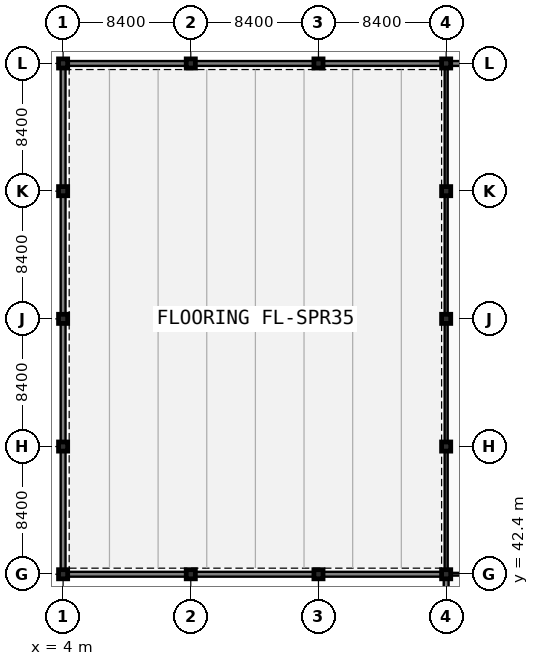
"""IFC4 building model, lengths in metres.
Left out: names, types, materials, properties, quantities, classifications, styles, units other than length and angle.
Written with IfcOpenShell. Run it as: python <this file> out.ifc"""

import sys

from ifc_helpers import new_model, si_unit, direction, frame, frame_2d, origin, origin_2d, place, context, subcontext, project, spatial, rectangle, extrude, element, fill, save


model = new_model("IFC4")
c1 = context("Model", 3, precision=1e-05, world=origin(), true_north=direction((0.0, 1.0)))
c2 = subcontext(c1, "Body", "Model", "MODEL_VIEW")
j1 = project(units=[si_unit("LENGTHUNIT", "METRE"), si_unit("PLANEANGLEUNIT", "RADIAN")], contexts=[c1])
p1 = place(None, origin())
s1 = spatial("IfcSite", under=j1, at=p1, CompositionType="ELEMENT")
p2 = place(p1, origin())
s2 = spatial("IfcBuilding", under=s1, at=p2, CompositionType="ELEMENT")
p3 = place(p2, origin())
s3 = spatial("IfcBuildingStorey", under=s2, at=p3, CompositionType="ELEMENT", Elevation=0.0)
for number, where, z_axis, x_axis in (
    (1, (4.0, 42.4, 0.0), (0.0, 0.0, 1.0), (1.0, 0.0, 0.0)),
    (2, (4.0, 50.8, 0.0), (0.0, 0.0, 1.0), (1.0, 0.0, 0.0)),
    (3, (4.0, 59.2, 0.0), (0.0, 0.0, 1.0), (1.0, 0.0, 0.0)),
    (4, (4.0, 67.6, 0.0), (0.0, 0.0, 1.0), (1.0, 0.0, 0.0)),
    (5, (4.0, 76.0, 0.0), (0.0, 0.0, 1.0), (1.0, 0.0, 0.0)),
    (6, (12.4, 42.4, 0.0), (0.0, 0.0, 1.0), (1.0, 0.0, 0.0)),
    (7, (12.4, 76.0, 0.0), (0.0, 0.0, 1.0), (1.0, 0.0, 0.0)),
    (8, (20.8, 42.4, 0.0), (0.0, 0.0, 1.0), (1.0, 0.0, 0.0)),
    (9, (20.8, 76.0, 0.0), (0.0, 0.0, 1.0), (1.0, 0.0, 0.0)),
    (10, (29.2, 42.4, 0.0), (0.0, 0.0, 1.0), (1.0, 0.0, 0.0)),
    (11, (29.2, 50.8, 0.0), (0.0, 0.0, 1.0), (1.0, 0.0, 0.0)),
    (12, (29.2, 59.2, 0.0), (0.0, 0.0, 1.0), (1.0, 0.0, 0.0)),
    (13, (29.2, 67.6, 0.0), (0.0, 0.0, 1.0), (1.0, 0.0, 0.0)),
    (14, (29.2, 76.0, 0.0), (0.0, 0.0, 1.0), (1.0, 0.0, 0.0)),
):
    element("IfcColumn", number, at=place(p3, frame(where, z_axis=z_axis, x_axis=x_axis)), inside=s3, PredefinedType="COLUMN", context=c2, shape_type="SweptSolid", body=[
        extrude(rectangle(XDim=0.6, YDim=0.6, at=origin_2d()), origin(), (0.0, 0.0, 1.0), 5.4),
    ])
p4 = place(p3, frame((29.35, 42.4, 0.0), z_axis=(0.0, 0.0, 1.0), x_axis=(1.0, 0.0, 0.0)))
e15 = element("IfcWall", 15, at=p4, inside=s3, PredefinedType="PARTITIONING", context=c2, shape_type="SweptSolid", body=[
    extrude(rectangle(XDim=8.1, YDim=0.18, at=frame_2d((4.05, 0.0))), origin(), (0.0, 0.0, 1.0), 4.64),
])
p5 = place(p4, frame((2.205, 0.0, -0.01)))
e16 = element("IfcOpeningElement", 16, at=p5, cuts=e15, PredefinedType="OPENING", context=c2, shape_type="SweptSolid", body=[
    extrude(rectangle(XDim=1.8, YDim=2.26, at=frame_2d((0.9, 1.13))), frame((0.0, 0.1, 0.0), z_axis=(0.0, -1.0, 0.0), x_axis=(1.0, 0.0, 0.0)), (0.0, 0.0, 1.0), 0.2),
])
p6 = place(p3, frame((29.2, 42.25, 0.0), z_axis=(0.0, 0.0, 1.0), x_axis=(0.0, 1.0, 0.0)))
e17 = element("IfcWall", 17, at=p6, inside=s3, PredefinedType="PARTITIONING", context=c2, shape_type="SweptSolid", body=[
    extrude(rectangle(XDim=33.6, YDim=0.2, at=frame_2d((16.8, 0.0))), origin(), (0.0, 0.0, 1.0), 4.54),
])
p7 = place(p6, frame((14.31, 0.0, -0.01)))
e18 = element("IfcOpeningElement", 18, at=p7, cuts=e17, PredefinedType="OPENING", context=c2, shape_type="SweptSolid", body=[
    extrude(rectangle(XDim=1.8, YDim=2.26, at=frame_2d((0.9, 1.13))), frame((0.0, 0.11, 0.0), z_axis=(0.0, -1.0, 0.0), x_axis=(1.0, 0.0, 0.0)), (0.0, 0.0, 1.0), 0.22),
])
p8 = place(p3, frame((4.0, 42.4, 0.0), z_axis=(0.0, 0.0, 1.0), x_axis=(1.0, 0.0, 0.0)))
e19 = element("IfcWall", 19, at=p8, inside=s3, PredefinedType="SOLIDWALL", context=c2, shape_type="SweptSolid", body=[
    extrude(rectangle(XDim=8.4, YDim=0.32, at=frame_2d((4.2, 0.0))), origin(), (0.0, 0.0, 1.0), 4.79),
])
p9 = place(p8, frame((0.46, 0.0, 0.9)))
e20 = element("IfcOpeningElement", 20, at=p9, cuts=e19, PredefinedType="OPENING", context=c2, shape_type="SweptSolid", body=[
    extrude(rectangle(XDim=2.4, YDim=2.35, at=frame_2d((1.2, 1.175))), frame((0.0, 0.17, 0.0), z_axis=(0.0, -1.0, 0.0), x_axis=(1.0, 0.0, 0.0)), (0.0, 0.0, 1.0), 0.34),
])
p10 = place(p8, frame((5.46, 0.0, 0.9)))
e21 = element("IfcOpeningElement", 21, at=p10, cuts=e19, PredefinedType="OPENING", context=c2, shape_type="SweptSolid", body=[
    extrude(rectangle(XDim=2.4, YDim=2.35, at=frame_2d((1.2, 1.175))), frame((0.0, 0.17, 0.0), z_axis=(0.0, -1.0, 0.0), x_axis=(1.0, 0.0, 0.0)), (0.0, 0.0, 1.0), 0.34),
])
p11 = place(p3, frame((12.4, 42.4, 0.0), z_axis=(0.0, 0.0, 1.0), x_axis=(1.0, 0.0, 0.0)))
e22 = element("IfcWall", 22, at=p11, inside=s3, PredefinedType="SOLIDWALL", context=c2, shape_type="SweptSolid", body=[
    extrude(rectangle(XDim=8.4, YDim=0.32, at=frame_2d((4.2, 0.0))), origin(), (0.0, 0.0, 1.0), 4.79),
])
p12 = place(p11, frame((0.46, 0.0, 0.9)))
e23 = element("IfcOpeningElement", 23, at=p12, cuts=e22, PredefinedType="OPENING", context=c2, shape_type="SweptSolid", body=[
    extrude(rectangle(XDim=2.4, YDim=2.35, at=frame_2d((1.2, 1.175))), frame((0.0, 0.17, 0.0), z_axis=(0.0, -1.0, 0.0), x_axis=(1.0, 0.0, 0.0)), (0.0, 0.0, 1.0), 0.34),
])
p13 = place(p11, frame((5.46, 0.0, 0.9)))
e24 = element("IfcOpeningElement", 24, at=p13, cuts=e22, PredefinedType="OPENING", context=c2, shape_type="SweptSolid", body=[
    extrude(rectangle(XDim=2.4, YDim=2.35, at=frame_2d((1.2, 1.175))), frame((0.0, 0.17, 0.0), z_axis=(0.0, -1.0, 0.0), x_axis=(1.0, 0.0, 0.0)), (0.0, 0.0, 1.0), 0.34),
])
p14 = place(p3, frame((20.8, 42.4, 0.0), z_axis=(0.0, 0.0, 1.0), x_axis=(1.0, 0.0, 0.0)))
e25 = element("IfcWall", 25, at=p14, inside=s3, PredefinedType="SOLIDWALL", context=c2, shape_type="SweptSolid", body=[
    extrude(rectangle(XDim=8.4, YDim=0.32, at=frame_2d((4.2, 0.0))), origin(), (0.0, 0.0, 1.0), 4.64),
])
p15 = place(p14, frame((0.46, 0.0, 0.9)))
e26 = element("IfcOpeningElement", 26, at=p15, cuts=e25, PredefinedType="OPENING", context=c2, shape_type="SweptSolid", body=[
    extrude(rectangle(XDim=2.4, YDim=2.35, at=frame_2d((1.2, 1.175))), frame((0.0, 0.17, 0.0), z_axis=(0.0, -1.0, 0.0), x_axis=(1.0, 0.0, 0.0)), (0.0, 0.0, 1.0), 0.34),
])
p16 = place(p14, frame((5.46, 0.0, 0.9)))
e27 = element("IfcOpeningElement", 27, at=p16, cuts=e25, PredefinedType="OPENING", context=c2, shape_type="SweptSolid", body=[
    extrude(rectangle(XDim=2.4, YDim=2.35, at=frame_2d((1.2, 1.175))), frame((0.0, 0.17, 0.0), z_axis=(0.0, -1.0, 0.0), x_axis=(1.0, 0.0, 0.0)), (0.0, 0.0, 1.0), 0.34),
])
p17 = place(p3, frame((12.4, 76.0, 0.0), z_axis=(0.0, 0.0, 1.0), x_axis=(-1.0, 0.0, 0.0)))
e28 = element("IfcWall", 28, at=p17, inside=s3, PredefinedType="SOLIDWALL", context=c2, shape_type="SweptSolid", body=[
    extrude(rectangle(XDim=8.4, YDim=0.32, at=frame_2d((4.2, 0.0))), origin(), (0.0, 0.0, 1.0), 4.79),
])
p18 = place(p17, frame((0.46, 0.0, 0.9)))
e29 = element("IfcOpeningElement", 29, at=p18, cuts=e28, PredefinedType="OPENING", context=c2, shape_type="SweptSolid", body=[
    extrude(rectangle(XDim=2.4, YDim=2.35, at=frame_2d((1.2, 1.175))), frame((0.0, 0.17, 0.0), z_axis=(0.0, -1.0, 0.0), x_axis=(1.0, 0.0, 0.0)), (0.0, 0.0, 1.0), 0.34),
])
p19 = place(p17, frame((5.46, 0.0, 0.9)))
e30 = element("IfcOpeningElement", 30, at=p19, cuts=e28, PredefinedType="OPENING", context=c2, shape_type="SweptSolid", body=[
    extrude(rectangle(XDim=2.4, YDim=2.35, at=frame_2d((1.2, 1.175))), frame((0.0, 0.17, 0.0), z_axis=(0.0, -1.0, 0.0), x_axis=(1.0, 0.0, 0.0)), (0.0, 0.0, 1.0), 0.34),
])
p20 = place(p3, frame((20.8, 76.0, 0.0), z_axis=(0.0, 0.0, 1.0), x_axis=(-1.0, 0.0, 0.0)))
e31 = element("IfcWall", 31, at=p20, inside=s3, PredefinedType="SOLIDWALL", context=c2, shape_type="SweptSolid", body=[
    extrude(rectangle(XDim=8.4, YDim=0.32, at=frame_2d((4.2, 0.0))), origin(), (0.0, 0.0, 1.0), 4.79),
])
p21 = place(p20, frame((0.46, 0.0, 0.9)))
e32 = element("IfcOpeningElement", 32, at=p21, cuts=e31, PredefinedType="OPENING", context=c2, shape_type="SweptSolid", body=[
    extrude(rectangle(XDim=2.4, YDim=2.35, at=frame_2d((1.2, 1.175))), frame((0.0, 0.17, 0.0), z_axis=(0.0, -1.0, 0.0), x_axis=(1.0, 0.0, 0.0)), (0.0, 0.0, 1.0), 0.34),
])
p22 = place(p20, frame((5.46, 0.0, 0.9)))
e33 = element("IfcOpeningElement", 33, at=p22, cuts=e31, PredefinedType="OPENING", context=c2, shape_type="SweptSolid", body=[
    extrude(rectangle(XDim=2.4, YDim=2.35, at=frame_2d((1.2, 1.175))), frame((0.0, 0.17, 0.0), z_axis=(0.0, -1.0, 0.0), x_axis=(1.0, 0.0, 0.0)), (0.0, 0.0, 1.0), 0.34),
])
p23 = place(p3, frame((29.2, 76.0, 0.0), z_axis=(0.0, 0.0, 1.0), x_axis=(-1.0, 0.0, 0.0)))
e34 = element("IfcWall", 34, at=p23, inside=s3, PredefinedType="SOLIDWALL", context=c2, shape_type="SweptSolid", body=[
    extrude(rectangle(XDim=8.4, YDim=0.32, at=frame_2d((4.2, 0.0))), origin(), (0.0, 0.0, 1.0), 4.64),
])
p24 = place(p23, frame((0.46, 0.0, 0.9)))
e35 = element("IfcOpeningElement", 35, at=p24, cuts=e34, PredefinedType="OPENING", context=c2, shape_type="SweptSolid", body=[
    extrude(rectangle(XDim=2.4, YDim=2.35, at=frame_2d((1.2, 1.175))), frame((0.0, 0.17, 0.0), z_axis=(0.0, -1.0, 0.0), x_axis=(1.0, 0.0, 0.0)), (0.0, 0.0, 1.0), 0.34),
])
p25 = place(p23, frame((5.46, 0.0, 0.9)))
e36 = element("IfcOpeningElement", 36, at=p25, cuts=e34, PredefinedType="OPENING", context=c2, shape_type="SweptSolid", body=[
    extrude(rectangle(XDim=2.4, YDim=2.35, at=frame_2d((1.2, 1.175))), frame((0.0, 0.17, 0.0), z_axis=(0.0, -1.0, 0.0), x_axis=(1.0, 0.0, 0.0)), (0.0, 0.0, 1.0), 0.34),
])
p26 = place(p3, frame((37.6, 76.0, 0.0), z_axis=(0.0, 0.0, 1.0), x_axis=(-1.0, 0.0, 0.0)))
e37 = element("IfcWall", 37, at=p26, inside=s3, PredefinedType="SOLIDWALL", context=c2, shape_type="SweptSolid", body=[
    extrude(rectangle(XDim=8.4, YDim=0.32, at=frame_2d((4.2, 0.0))), origin(), (0.0, 0.0, 1.0), 4.64),
])
p27 = place(p26, frame((0.46, 0.0, 0.9)))
e38 = element("IfcOpeningElement", 38, at=p27, cuts=e37, PredefinedType="OPENING", context=c2, shape_type="SweptSolid", body=[
    extrude(rectangle(XDim=2.4, YDim=2.35, at=frame_2d((1.2, 1.175))), frame((0.0, 0.17, 0.0), z_axis=(0.0, -1.0, 0.0), x_axis=(1.0, 0.0, 0.0)), (0.0, 0.0, 1.0), 0.34),
])
p28 = place(p26, frame((5.46, 0.0, 0.9)))
e39 = element("IfcOpeningElement", 39, at=p28, cuts=e37, PredefinedType="OPENING", context=c2, shape_type="SweptSolid", body=[
    extrude(rectangle(XDim=2.4, YDim=2.35, at=frame_2d((1.2, 1.175))), frame((0.0, 0.17, 0.0), z_axis=(0.0, -1.0, 0.0), x_axis=(1.0, 0.0, 0.0)), (0.0, 0.0, 1.0), 0.34),
])
p29 = place(p3, frame((4.0, 50.8, 0.0), z_axis=(0.0, 0.0, 1.0), x_axis=(0.0, -1.0, 0.0)))
e40 = element("IfcWall", 40, at=p29, inside=s3, PredefinedType="SOLIDWALL", context=c2, shape_type="SweptSolid", body=[
    extrude(rectangle(XDim=8.4, YDim=0.32, at=frame_2d((4.2, 0.0))), origin(), (0.0, 0.0, 1.0), 4.79),
])
p30 = place(p3, frame((4.0, 59.2, 0.0), z_axis=(0.0, 0.0, 1.0), x_axis=(0.0, -1.0, 0.0)))
e41 = element("IfcWall", 41, at=p30, inside=s3, PredefinedType="SOLIDWALL", context=c2, shape_type="SweptSolid", body=[
    extrude(rectangle(XDim=8.4, YDim=0.32, at=frame_2d((4.2, 0.0))), origin(), (0.0, 0.0, 1.0), 4.79),
])
p31 = place(p30, frame((3.5, 0.0, -0.01)))
e42 = element("IfcOpeningElement", 42, at=p31, cuts=e41, PredefinedType="OPENING", context=c2, shape_type="SweptSolid", body=[
    extrude(rectangle(XDim=1.4, YDim=2.21, at=frame_2d((0.7, 1.105))), frame((0.0, 0.17, 0.0), z_axis=(0.0, -1.0, 0.0), x_axis=(1.0, 0.0, 0.0)), (0.0, 0.0, 1.0), 0.34),
])
p32 = place(p3, frame((4.0, 67.6, 0.0), z_axis=(0.0, 0.0, 1.0), x_axis=(0.0, -1.0, 0.0)))
e43 = element("IfcWall", 43, at=p32, inside=s3, PredefinedType="SOLIDWALL", context=c2, shape_type="SweptSolid", body=[
    extrude(rectangle(XDim=8.4, YDim=0.32, at=frame_2d((4.2, 0.0))), origin(), (0.0, 0.0, 1.0), 4.79),
])
p33 = place(p3, frame((4.0, 76.0, 0.0), z_axis=(0.0, 0.0, 1.0), x_axis=(0.0, -1.0, 0.0)))
e44 = element("IfcWall", 44, at=p33, inside=s3, PredefinedType="SOLIDWALL", context=c2, shape_type="SweptSolid", body=[
    extrude(rectangle(XDim=8.4, YDim=0.32, at=frame_2d((4.2, 0.0))), origin(), (0.0, 0.0, 1.0), 4.79),
])
p34 = place(p3, frame((29.2, 42.4, 0.0), z_axis=(0.0, 0.0, 1.0), x_axis=(0.0, -1.0, 0.0)))
e45 = element("IfcWall", 45, at=p34, inside=s3, PredefinedType="SOLIDWALL", context=c2, shape_type="SweptSolid", body=[
    extrude(rectangle(XDim=4.8, YDim=0.32, at=frame_2d((2.4, 0.0))), origin(), (0.0, 0.0, 1.0), 4.64),
])
p35 = place(p34, frame((1.46, 0.0, 0.9)))
e46 = element("IfcOpeningElement", 46, at=p35, cuts=e45, PredefinedType="OPENING", context=c2, shape_type="SweptSolid", body=[
    extrude(rectangle(XDim=1.8, YDim=2.2, at=frame_2d((0.9, 1.1))), frame((0.0, 0.17, 0.0), z_axis=(0.0, -1.0, 0.0), x_axis=(1.0, 0.0, 0.0)), (0.0, 0.0, 1.0), 0.34),
])
p36 = place(p7, frame((0.0, 0.0, 0.01)))
e47 = element("IfcDoor", 47, at=p36, inside=s3, OperationType="DOUBLE_SWING_LEFT", PredefinedType="DOOR", context=c2, shape_type="SweptSolid", body=[
    extrude(rectangle(XDim=1.8, YDim=2.25, at=frame_2d((0.9, 1.125))), frame((0.0, 0.025, 0.0), z_axis=(0.0, -1.0, 0.0), x_axis=(1.0, 0.0, 0.0)), (0.0, 0.0, 1.0), 0.05),
])
fill(e18, e47)
p37 = place(p9, origin())
e48 = element("IfcWindow", 48, at=p37, inside=s3, PartitioningType="TRIPLE_PANEL_VERTICAL", PredefinedType="WINDOW", context=c2, shape_type="SweptSolid", body=[
    extrude(rectangle(XDim=2.4, YDim=2.35, at=frame_2d((1.2, 1.175))), frame((0.0, 0.03, 0.0), z_axis=(0.0, -1.0, 0.0), x_axis=(1.0, 0.0, 0.0)), (0.0, 0.0, 1.0), 0.06),
])
fill(e20, e48)
p38 = place(p10, origin())
e49 = element("IfcWindow", 49, at=p38, inside=s3, PartitioningType="TRIPLE_PANEL_VERTICAL", PredefinedType="WINDOW", context=c2, shape_type="SweptSolid", body=[
    extrude(rectangle(XDim=2.4, YDim=2.35, at=frame_2d((1.2, 1.175))), frame((0.0, 0.03, 0.0), z_axis=(0.0, -1.0, 0.0), x_axis=(1.0, 0.0, 0.0)), (0.0, 0.0, 1.0), 0.06),
])
fill(e21, e49)
p39 = place(p12, origin())
e50 = element("IfcWindow", 50, at=p39, inside=s3, PartitioningType="TRIPLE_PANEL_VERTICAL", PredefinedType="WINDOW", context=c2, shape_type="SweptSolid", body=[
    extrude(rectangle(XDim=2.4, YDim=2.35, at=frame_2d((1.2, 1.175))), frame((0.0, 0.03, 0.0), z_axis=(0.0, -1.0, 0.0), x_axis=(1.0, 0.0, 0.0)), (0.0, 0.0, 1.0), 0.06),
])
fill(e23, e50)
p40 = place(p13, origin())
e51 = element("IfcWindow", 51, at=p40, inside=s3, PartitioningType="TRIPLE_PANEL_VERTICAL", PredefinedType="WINDOW", context=c2, shape_type="SweptSolid", body=[
    extrude(rectangle(XDim=2.4, YDim=2.35, at=frame_2d((1.2, 1.175))), frame((0.0, 0.03, 0.0), z_axis=(0.0, -1.0, 0.0), x_axis=(1.0, 0.0, 0.0)), (0.0, 0.0, 1.0), 0.06),
])
fill(e24, e51)
p41 = place(p15, origin())
e52 = element("IfcWindow", 52, at=p41, inside=s3, PartitioningType="TRIPLE_PANEL_VERTICAL", PredefinedType="WINDOW", context=c2, shape_type="SweptSolid", body=[
    extrude(rectangle(XDim=2.4, YDim=2.35, at=frame_2d((1.2, 1.175))), frame((0.0, 0.03, 0.0), z_axis=(0.0, -1.0, 0.0), x_axis=(1.0, 0.0, 0.0)), (0.0, 0.0, 1.0), 0.06),
])
fill(e26, e52)
p42 = place(p16, origin())
e53 = element("IfcWindow", 53, at=p42, inside=s3, PartitioningType="TRIPLE_PANEL_VERTICAL", PredefinedType="WINDOW", context=c2, shape_type="SweptSolid", body=[
    extrude(rectangle(XDim=2.4, YDim=2.35, at=frame_2d((1.2, 1.175))), frame((0.0, 0.03, 0.0), z_axis=(0.0, -1.0, 0.0), x_axis=(1.0, 0.0, 0.0)), (0.0, 0.0, 1.0), 0.06),
])
fill(e27, e53)
p43 = place(p18, origin())
e54 = element("IfcWindow", 54, at=p43, inside=s3, PartitioningType="TRIPLE_PANEL_VERTICAL", PredefinedType="WINDOW", context=c2, shape_type="SweptSolid", body=[
    extrude(rectangle(XDim=2.4, YDim=2.35, at=frame_2d((1.2, 1.175))), frame((0.0, 0.03, 0.0), z_axis=(0.0, -1.0, 0.0), x_axis=(1.0, 0.0, 0.0)), (0.0, 0.0, 1.0), 0.06),
])
fill(e29, e54)
p44 = place(p19, origin())
e55 = element("IfcWindow", 55, at=p44, inside=s3, PartitioningType="TRIPLE_PANEL_VERTICAL", PredefinedType="WINDOW", context=c2, shape_type="SweptSolid", body=[
    extrude(rectangle(XDim=2.4, YDim=2.35, at=frame_2d((1.2, 1.175))), frame((0.0, 0.03, 0.0), z_axis=(0.0, -1.0, 0.0), x_axis=(1.0, 0.0, 0.0)), (0.0, 0.0, 1.0), 0.06),
])
fill(e30, e55)
p45 = place(p21, origin())
e56 = element("IfcWindow", 56, at=p45, inside=s3, PartitioningType="TRIPLE_PANEL_VERTICAL", PredefinedType="WINDOW", context=c2, shape_type="SweptSolid", body=[
    extrude(rectangle(XDim=2.4, YDim=2.35, at=frame_2d((1.2, 1.175))), frame((0.0, 0.03, 0.0), z_axis=(0.0, -1.0, 0.0), x_axis=(1.0, 0.0, 0.0)), (0.0, 0.0, 1.0), 0.06),
])
fill(e32, e56)
p46 = place(p22, origin())
e57 = element("IfcWindow", 57, at=p46, inside=s3, PartitioningType="TRIPLE_PANEL_VERTICAL", PredefinedType="WINDOW", context=c2, shape_type="SweptSolid", body=[
    extrude(rectangle(XDim=2.4, YDim=2.35, at=frame_2d((1.2, 1.175))), frame((0.0, 0.03, 0.0), z_axis=(0.0, -1.0, 0.0), x_axis=(1.0, 0.0, 0.0)), (0.0, 0.0, 1.0), 0.06),
])
fill(e33, e57)
p47 = place(p24, origin())
e58 = element("IfcWindow", 58, at=p47, inside=s3, PartitioningType="TRIPLE_PANEL_VERTICAL", PredefinedType="WINDOW", context=c2, shape_type="SweptSolid", body=[
    extrude(rectangle(XDim=2.4, YDim=2.35, at=frame_2d((1.2, 1.175))), frame((0.0, 0.03, 0.0), z_axis=(0.0, -1.0, 0.0), x_axis=(1.0, 0.0, 0.0)), (0.0, 0.0, 1.0), 0.06),
])
fill(e35, e58)
p48 = place(p25, origin())
e59 = element("IfcWindow", 59, at=p48, inside=s3, PartitioningType="TRIPLE_PANEL_VERTICAL", PredefinedType="WINDOW", context=c2, shape_type="SweptSolid", body=[
    extrude(rectangle(XDim=2.4, YDim=2.35, at=frame_2d((1.2, 1.175))), frame((0.0, 0.03, 0.0), z_axis=(0.0, -1.0, 0.0), x_axis=(1.0, 0.0, 0.0)), (0.0, 0.0, 1.0), 0.06),
])
fill(e36, e59)
p49 = place(p28, origin())
e60 = element("IfcWindow", 60, at=p49, inside=s3, PartitioningType="TRIPLE_PANEL_VERTICAL", PredefinedType="WINDOW", context=c2, shape_type="SweptSolid", body=[
    extrude(rectangle(XDim=2.4, YDim=2.35, at=frame_2d((1.2, 1.175))), frame((0.0, 0.03, 0.0), z_axis=(0.0, -1.0, 0.0), x_axis=(1.0, 0.0, 0.0)), (0.0, 0.0, 1.0), 0.06),
])
fill(e39, e60)
p50 = place(p31, frame((0.0, 0.0, 0.01)))
e61 = element("IfcDoor", 61, at=p50, inside=s3, OperationType="SINGLE_SWING_LEFT", PredefinedType="DOOR", context=c2, shape_type="SweptSolid", body=[
    extrude(rectangle(XDim=1.4, YDim=2.2, at=frame_2d((0.7, 1.1))), frame((0.0, 0.025, 0.0), z_axis=(0.0, -1.0, 0.0), x_axis=(1.0, 0.0, 0.0)), (0.0, 0.0, 1.0), 0.05),
])
fill(e42, e61)
save(model, sys.argv[1])
